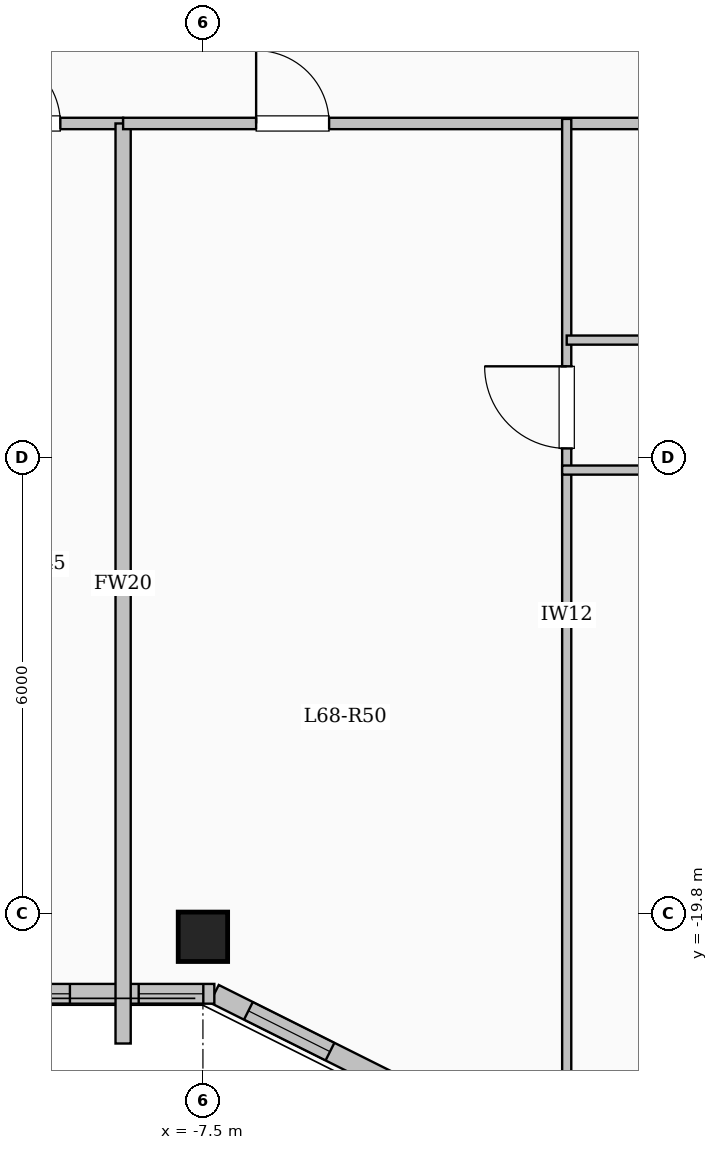
"""IFC4 building model, lengths in metres.
Left out: names, types, materials, properties, quantities, classifications, styles, units other than length and angle.
Written with IfcOpenShell. Run it as: python <this file> out.ifc"""

import sys

from ifc_helpers import new_model, si_unit, direction, frame, frame_2d, origin, origin_2d, place, context, subcontext, project, spatial, rectangle, extrude, element, fill, save


model = new_model("IFC4")
c1 = context("Model", 3, precision=1e-05, world=origin(), true_north=direction((0.0, 1.0)))
c2 = subcontext(c1, "Body", "Model", "MODEL_VIEW")
j1 = project(units=[si_unit("LENGTHUNIT", "METRE"), si_unit("PLANEANGLEUNIT", "RADIAN")], contexts=[c1])
p1 = place(None, origin())
s1 = spatial("IfcSite", under=j1, at=p1, CompositionType="ELEMENT")
p2 = place(p1, origin())
s2 = spatial("IfcBuilding", under=s1, at=p2, CompositionType="ELEMENT")
p3 = place(p2, frame((0.0, 0.0, 251.55)))
s3 = spatial("IfcBuildingStorey", under=s2, at=p3, CompositionType="ELEMENT", Elevation=251.55)
p4 = place(p3, frame((-7.5, -20.1, 0.0), z_axis=(0.0, 0.0, 1.0), x_axis=(1.0, 0.0, 0.0)))
e1 = element("IfcColumn", 1, at=p4, inside=s3, PredefinedType="COLUMN", context=c2, shape_type="SweptSolid", body=[
    extrude(rectangle(XDim=0.65, YDim=0.65, at=origin_2d()), origin(), (0.0, 0.0, 1.0), 3.35),
])
p5 = place(p3, frame((-4.35, -22.35, 0.0), z_axis=(0.0, 0.0, 1.0), x_axis=(-0.894427191, 0.4472135955, 0.0)))
e2 = element("IfcWall", 2, at=p5, inside=s3, PredefinedType="SOLIDWALL", context=c2, shape_type="SweptSolid", body=[
    extrude(rectangle(XDim=3.354, YDim=0.26, at=frame_2d((1.677, 0.0))), origin(), (0.0, 0.0, 1.0), 3.1),
])
p6 = place(p5, frame((1.653, 0.0, 0.95)))
e3 = element("IfcOpeningElement", 3, at=p6, cuts=e2, PredefinedType="OPENING", context=c2, shape_type="SweptSolid", body=[
    extrude(rectangle(XDim=1.2, YDim=1.5, at=frame_2d((0.6, 0.75))), frame((0.0, 0.14, 0.0), z_axis=(0.0, -1.0, 0.0), x_axis=(1.0, 0.0, 0.0)), (0.0, 0.0, 1.0), 0.28),
])
p7 = place(p3, frame((-7.35, -20.85, 0.0), z_axis=(0.0, 0.0, 1.0), x_axis=(-1.0, 0.0, 0.0)))
e4 = element("IfcWall", 4, at=p7, inside=s3, PredefinedType="SOLIDWALL", context=c2, shape_type="SweptSolid", body=[
    extrude(rectangle(XDim=10.5, YDim=0.26, at=frame_2d((5.25, 0.0))), origin(), (0.0, 0.0, 1.0), 3.1),
])
p8 = place(p7, frame((0.145, 0.0, 0.95)))
e5 = element("IfcOpeningElement", 5, at=p8, cuts=e4, PredefinedType="OPENING", context=c2, shape_type="SweptSolid", body=[
    extrude(rectangle(XDim=0.85, YDim=1.5, at=frame_2d((0.425, 0.75))), frame((0.0, 0.14, 0.0), z_axis=(0.0, -1.0, 0.0), x_axis=(1.0, 0.0, 0.0)), (0.0, 0.0, 1.0), 0.28),
])
p9 = place(p7, frame((1.9, 0.0, 0.95)))
e6 = element("IfcOpeningElement", 6, at=p9, cuts=e4, PredefinedType="OPENING", context=c2, shape_type="SweptSolid", body=[
    extrude(rectangle(XDim=1.2, YDim=1.5, at=frame_2d((0.6, 0.75))), frame((0.0, 0.14, 0.0), z_axis=(0.0, -1.0, 0.0), x_axis=(1.0, 0.0, 0.0)), (0.0, 0.0, 1.0), 0.28),
])
p10 = place(p7, frame((4.8, 0.0, 0.95)))
e7 = element("IfcOpeningElement", 7, at=p10, cuts=e4, PredefinedType="OPENING", context=c2, shape_type="SweptSolid", body=[
    extrude(rectangle(XDim=1.35, YDim=1.55, at=frame_2d((0.675, 0.775))), frame((0.0, 0.14, 0.0), z_axis=(0.0, -1.0, 0.0), x_axis=(1.0, 0.0, 0.0)), (0.0, 0.0, 1.0), 0.28),
])
p11 = place(p7, frame((7.975, 0.0, 0.9)))
e8 = element("IfcOpeningElement", 8, at=p11, cuts=e4, PredefinedType="OPENING", context=c2, shape_type="SweptSolid", body=[
    extrude(rectangle(XDim=1.65, YDim=1.6, at=frame_2d((0.825, 0.8))), frame((0.0, 0.14, 0.0), z_axis=(0.0, -1.0, 0.0), x_axis=(1.0, 0.0, 0.0)), (0.0, 0.0, 1.0), 0.28),
])
p12 = place(p3, frame((-17.75, -9.4, 0.0), z_axis=(0.0, 0.0, 1.0), x_axis=(1.0, 0.0, 0.0)))
e9 = element("IfcWall", 9, at=p12, inside=s3, PredefinedType="PARTITIONING", context=c2, shape_type="SweptSolid", body=[
    extrude(rectangle(XDim=9.2, YDim=0.15, at=frame_2d((4.6, 0.0))), origin(), (0.0, 0.0, 1.0), 3.1),
])
p13 = place(p12, frame((1.142, 0.0, 0.0)))
e10 = element("IfcOpeningElement", 10, at=p13, cuts=e9, PredefinedType="OPENING", context=c2, shape_type="SweptSolid", body=[
    extrude(rectangle(XDim=0.95, YDim=2.15, at=frame_2d((0.475, 1.075))), frame((0.0, 0.085, 0.0), z_axis=(0.0, -1.0, 0.0), x_axis=(1.0, 0.0, 0.0)), (0.0, 0.0, 1.0), 0.17),
])
p14 = place(p12, frame((4.466, 0.0, 0.0)))
e11 = element("IfcOpeningElement", 11, at=p14, cuts=e9, PredefinedType="OPENING", context=c2, shape_type="SweptSolid", body=[
    extrude(rectangle(XDim=0.95, YDim=2.15, at=frame_2d((0.475, 1.075))), frame((0.0, 0.085, 0.0), z_axis=(0.0, -1.0, 0.0), x_axis=(1.0, 0.0, 0.0)), (0.0, 0.0, 1.0), 0.17),
])
p15 = place(p12, frame((7.424, 0.0, 0.0)))
e12 = element("IfcOpeningElement", 12, at=p15, cuts=e9, PredefinedType="OPENING", context=c2, shape_type="SweptSolid", body=[
    extrude(rectangle(XDim=0.95, YDim=2.15, at=frame_2d((0.475, 1.075))), frame((0.0, 0.085, 0.0), z_axis=(0.0, -1.0, 0.0), x_axis=(1.0, 0.0, 0.0)), (0.0, 0.0, 1.0), 0.17),
])
p16 = place(p3, frame((-8.55, -21.504, 0.0), z_axis=(0.0, 0.0, 1.0), x_axis=(0.0, 1.0, 0.0)))
e13 = element("IfcWall", 13, at=p16, inside=s3, PredefinedType="SOLIDWALL", context=c2, shape_type="SweptSolid", body=[
    extrude(rectangle(XDim=12.104, YDim=0.2, at=frame_2d((6.052, 0.0))), origin(), (0.0, 0.0, 1.0), 3.1),
])
p17 = place(p3, frame((-8.55, -9.4, 0.0), z_axis=(0.0, 0.0, 1.0), x_axis=(1.0, 0.0, 0.0)))
e14 = element("IfcWall", 14, at=p17, inside=s3, PredefinedType="PARTITIONING", context=c2, shape_type="SweptSolid", body=[
    extrude(rectangle(XDim=17.1, YDim=0.15, at=frame_2d((8.55, 0.0))), origin(), (0.0, 0.0, 1.0), 3.1),
])
p18 = place(p17, frame((1.75, 0.0, 0.0)))
e15 = element("IfcOpeningElement", 15, at=p18, cuts=e14, PredefinedType="OPENING", context=c2, shape_type="SweptSolid", body=[
    extrude(rectangle(XDim=0.96, YDim=2.15, at=frame_2d((0.48, 1.075))), frame((0.0, 0.085, 0.0), z_axis=(0.0, -1.0, 0.0), x_axis=(1.0, 0.0, 0.0)), (0.0, 0.0, 1.0), 0.17),
])
p19 = place(p3, frame((-2.714, -22.38, 0.0), z_axis=(0.0, 0.0, 1.0), x_axis=(0.0, 1.0, 0.0)))
e16 = element("IfcWall", 16, at=p19, inside=s3, PredefinedType="PARTITIONING", context=c2, shape_type="SweptSolid", body=[
    extrude(rectangle(XDim=13.04, YDim=0.12, at=frame_2d((6.52, 0.0))), origin(), (0.0, 0.0, 1.0), 3.1),
])
p20 = place(p19, frame((8.705, 0.0, 0.0)))
e17 = element("IfcOpeningElement", 17, at=p20, cuts=e16, PredefinedType="OPENING", context=c2, shape_type="SweptSolid", body=[
    extrude(rectangle(XDim=1.08, YDim=2.15, at=frame_2d((0.54, 1.075))), frame((0.0, 0.07, 0.0), z_axis=(0.0, -1.0, 0.0), x_axis=(1.0, 0.0, 0.0)), (0.0, 0.0, 1.0), 0.14),
])
p21 = place(p3, frame((-2.714, -12.25, 0.0), z_axis=(0.0, 0.0, 1.0), x_axis=(1.0, 0.0, 0.0)))
e18 = element("IfcWall", 18, at=p21, inside=s3, PredefinedType="PARTITIONING", context=c2, shape_type="SweptSolid", body=[
    extrude(rectangle(XDim=5.485, YDim=0.12, at=frame_2d((2.743, 0.0))), origin(), (0.0, 0.0, 1.0), 2.785),
])
p22 = place(p21, frame((2.302, 0.0, 0.0)))
e19 = element("IfcOpeningElement", 19, at=p22, cuts=e18, PredefinedType="OPENING", context=c2, shape_type="SweptSolid", body=[
    extrude(rectangle(XDim=0.88, YDim=2.1, at=frame_2d((0.44, 1.05))), frame((0.0, 0.07, 0.0), z_axis=(0.0, -1.0, 0.0), x_axis=(1.0, 0.0, 0.0)), (0.0, 0.0, 1.0), 0.14),
])
p23 = place(p3, frame((-2.774, -13.96, 0.0), z_axis=(0.0, 0.0, 1.0), x_axis=(1.0, 0.0, 0.0)))
e20 = element("IfcWall", 20, at=p23, inside=s3, PredefinedType="PARTITIONING", context=c2, shape_type="SweptSolid", body=[
    extrude(rectangle(XDim=11.384, YDim=0.12, at=frame_2d((5.692, 0.0))), origin(), (0.0, 0.0, 1.0), 2.785),
])
p24 = place(p23, frame((1.426, 0.0, 0.0)))
e21 = element("IfcOpeningElement", 21, at=p24, cuts=e20, PredefinedType="OPENING", context=c2, shape_type="SweptSolid", body=[
    extrude(rectangle(XDim=0.88, YDim=2.1, at=frame_2d((0.44, 1.05))), frame((0.0, 0.07, 0.0), z_axis=(0.0, -1.0, 0.0), x_axis=(1.0, 0.0, 0.0)), (0.0, 0.0, 1.0), 0.14),
])
p25 = place(p23, frame((5.157, 0.0, 0.0)))
e22 = element("IfcOpeningElement", 22, at=p25, cuts=e20, PredefinedType="OPENING", context=c2, shape_type="SweptSolid", body=[
    extrude(rectangle(XDim=0.88, YDim=2.1, at=frame_2d((0.44, 1.05))), frame((0.0, 0.07, 0.0), z_axis=(0.0, -1.0, 0.0), x_axis=(1.0, 0.0, 0.0)), (0.0, 0.0, 1.0), 0.14),
])
p26 = place(p23, frame((8.888, 0.0, 0.0)))
e23 = element("IfcOpeningElement", 23, at=p26, cuts=e20, PredefinedType="OPENING", context=c2, shape_type="SweptSolid", body=[
    extrude(rectangle(XDim=0.88, YDim=2.1, at=frame_2d((0.44, 1.05))), frame((0.0, 0.07, 0.0), z_axis=(0.0, -1.0, 0.0), x_axis=(1.0, 0.0, 0.0)), (0.0, 0.0, 1.0), 0.14),
])
p27 = place(p6, origin())
e24 = element("IfcWindow", 24, at=p27, inside=s3, PartitioningType="SINGLE_PANEL", PredefinedType="WINDOW", context=c2, shape_type="SweptSolid", body=[
    extrude(rectangle(XDim=1.2, YDim=1.5, at=frame_2d((0.6, 0.75))), frame((0.0, 0.03, 0.0), z_axis=(0.0, -1.0, 0.0), x_axis=(1.0, 0.0, 0.0)), (0.0, 0.0, 1.0), 0.06),
])
fill(e3, e24)
p28 = place(p8, origin())
e25 = element("IfcWindow", 25, at=p28, inside=s3, PartitioningType="SINGLE_PANEL", PredefinedType="WINDOW", context=c2, shape_type="SweptSolid", body=[
    extrude(rectangle(XDim=0.85, YDim=1.5, at=frame_2d((0.425, 0.75))), frame((0.0, 0.03, 0.0), z_axis=(0.0, -1.0, 0.0), x_axis=(1.0, 0.0, 0.0)), (0.0, 0.0, 1.0), 0.06),
])
fill(e5, e25)
p29 = place(p9, origin())
e26 = element("IfcWindow", 26, at=p29, inside=s3, PartitioningType="SINGLE_PANEL", PredefinedType="WINDOW", context=c2, shape_type="SweptSolid", body=[
    extrude(rectangle(XDim=1.2, YDim=1.5, at=frame_2d((0.6, 0.75))), frame((0.0, 0.03, 0.0), z_axis=(0.0, -1.0, 0.0), x_axis=(1.0, 0.0, 0.0)), (0.0, 0.0, 1.0), 0.06),
])
fill(e6, e26)
p30 = place(p15, origin())
e27 = element("IfcDoor", 27, at=p30, inside=s3, OperationType="SINGLE_SWING_LEFT", PredefinedType="DOOR", context=c2, shape_type="SweptSolid", body=[
    extrude(rectangle(XDim=0.95, YDim=2.15, at=frame_2d((0.475, 1.075))), frame((0.0, 0.025, 0.0), z_axis=(0.0, -1.0, 0.0), x_axis=(1.0, 0.0, 0.0)), (0.0, 0.0, 1.0), 0.05),
])
fill(e12, e27)
p31 = place(p18, origin())
e28 = element("IfcDoor", 28, at=p31, inside=s3, OperationType="SINGLE_SWING_LEFT", PredefinedType="DOOR", context=c2, shape_type="SweptSolid", body=[
    extrude(rectangle(XDim=0.96, YDim=2.15, at=frame_2d((0.48, 1.075))), frame((0.0, 0.025, 0.0), z_axis=(0.0, -1.0, 0.0), x_axis=(1.0, 0.0, 0.0)), (0.0, 0.0, 1.0), 0.05),
])
fill(e15, e28)
p32 = place(p20, origin())
e29 = element("IfcDoor", 29, at=p32, inside=s3, OperationType="SINGLE_SWING_RIGHT", PredefinedType="DOOR", context=c2, shape_type="SweptSolid", body=[
    extrude(rectangle(XDim=1.08, YDim=2.15, at=frame_2d((0.54, 1.075))), frame((0.0, 0.025, 0.0), z_axis=(0.0, -1.0, 0.0), x_axis=(1.0, 0.0, 0.0)), (0.0, 0.0, 1.0), 0.05),
])
fill(e17, e29)
save(model, sys.argv[1])
